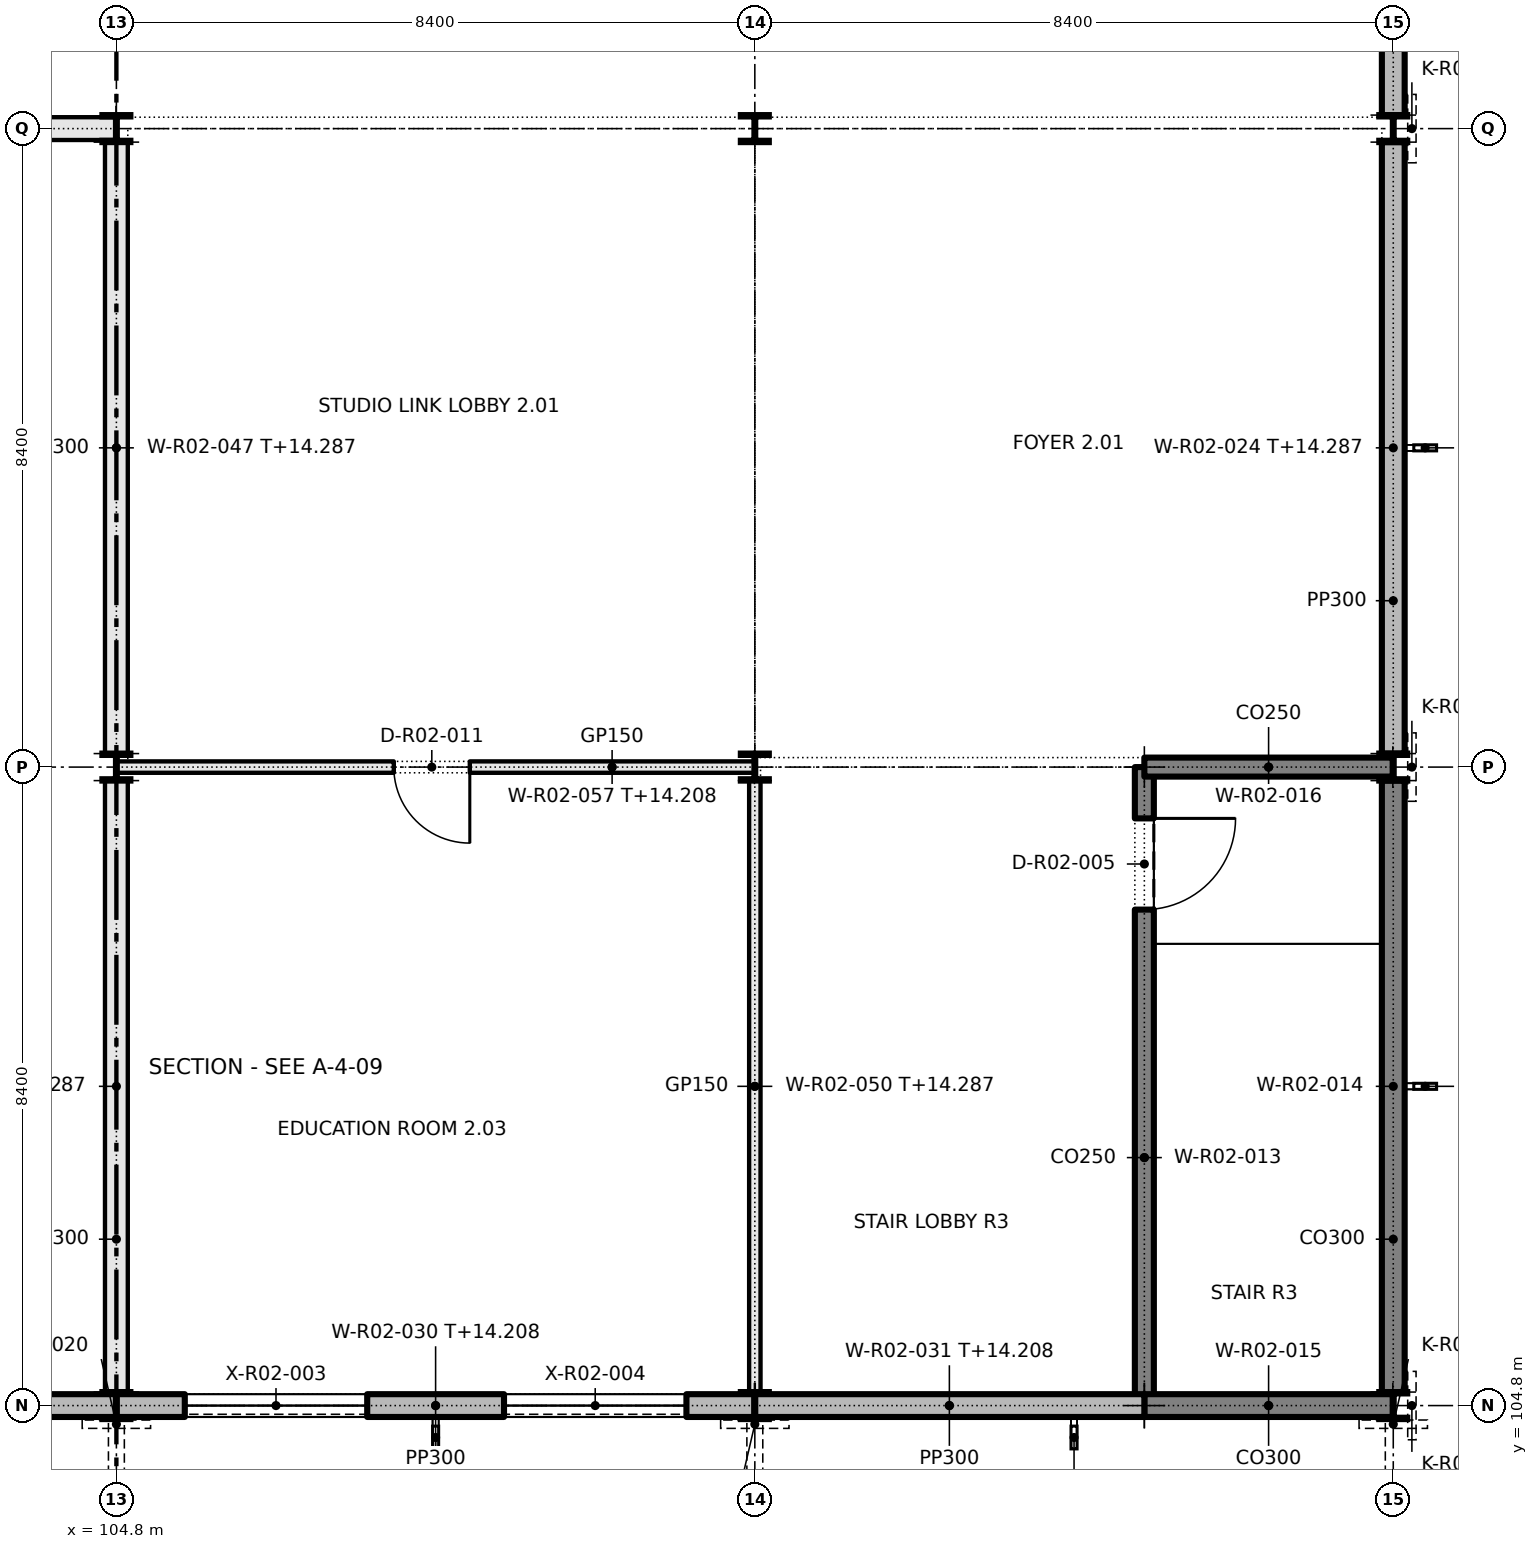
"""IFC4 building model, lengths in metres.
Left out: names, types, materials, properties, quantities, classifications, styles, units other than length and angle.
Written with IfcOpenShell. Run it as: python <this file> out.ifc"""

import sys

from ifc_helpers import new_model, si_unit, direction, frame, frame_2d, origin, origin_2d, place, context, subcontext, project, spatial, rectangle, i_section, extrude, element, fill, save


model = new_model("IFC4")
c1 = context("Model", 3, precision=1e-05, world=origin(), true_north=direction((0.0, 1.0)))
c2 = subcontext(c1, "Body", "Model", "MODEL_VIEW")
j1 = project(units=[si_unit("LENGTHUNIT", "METRE"), si_unit("PLANEANGLEUNIT", "RADIAN")], contexts=[c1])
p1 = place(None, origin())
s1 = spatial("IfcSite", under=j1, at=p1, CompositionType="ELEMENT")
p2 = place(p1, origin())
s2 = spatial("IfcBuilding", under=s1, at=p2, CompositionType="ELEMENT")
p3 = place(p2, frame((0.0, 0.0, 10.2)))
s3 = spatial("IfcBuildingStorey", under=s2, at=p3, CompositionType="ELEMENT", Elevation=10.2)
for number, where, z_axis, x_axis in (
    (1, (104.8, 104.8, 0.0), (0.0, 0.0, 1.0), (1.0, 0.0, 0.0)),
    (2, (104.8, 113.2, 0.0), (0.0, 0.0, 1.0), (1.0, 0.0, 0.0)),
    (3, (104.8, 121.6, 0.0), (0.0, 0.0, 1.0), (1.0, 0.0, 0.0)),
    (4, (113.2, 104.8, 0.0), (0.0, 0.0, 1.0), (1.0, 0.0, 0.0)),
    (5, (113.2, 113.2, 0.0), (0.0, 0.0, 1.0), (1.0, 0.0, 0.0)),
    (6, (113.2, 121.6, 0.0), (0.0, 0.0, 1.0), (1.0, 0.0, 0.0)),
    (7, (121.6, 104.8, 0.0), (0.0, 0.0, 1.0), (1.0, 0.0, 0.0)),
    (8, (121.6, 113.2, 0.0), (0.0, 0.0, 1.0), (1.0, 0.0, 0.0)),
    (9, (121.6, 121.6, 0.0), (0.0, 0.0, 1.0), (1.0, 0.0, 0.0)),
):
    element("IfcColumn", number, at=place(p3, frame(where, z_axis=z_axis, x_axis=x_axis)), inside=s3, PredefinedType="COLUMN", context=c2, shape_type="SweptSolid", body=[
        extrude(i_section(OverallWidth=0.368, OverallDepth=0.356, WebThickness=0.011, FlangeThickness=0.018, FilletRadius=0.015, at=origin_2d()), origin(), (0.0, 0.0, 1.0), 4.8),
    ])
p4 = place(p3, frame((118.325, 104.8, 0.0), z_axis=(0.0, 0.0, 1.0), x_axis=(0.0, 1.0, 0.0)))
e10 = element("IfcWall", 10, at=p4, inside=s3, PredefinedType="SHEAR", context=c2, shape_type="SweptSolid", body=[
    extrude(rectangle(XDim=8.4, YDim=0.25, at=frame_2d((4.2, 0.0))), origin(), (0.0, 0.0, 1.0), 4.8),
])
p5 = place(p4, frame((6.525, 0.0, 0.0)))
e11 = element("IfcOpeningElement", 11, at=p5, cuts=e10, PredefinedType="OPENING", context=c2, shape_type="SweptSolid", body=[
    extrude(rectangle(XDim=1.2, YDim=2.1, at=frame_2d((0.6, 1.05))), frame((0.0, 0.135, 0.0), z_axis=(0.0, -1.0, 0.0), x_axis=(1.0, 0.0, 0.0)), (0.0, 0.0, 1.0), 0.27),
])
p6 = place(p3, frame((121.6, 104.978, 0.0), z_axis=(0.0, 0.0, 1.0), x_axis=(0.0, 1.0, 0.0)))
e12 = element("IfcWall", 12, at=p6, inside=s3, PredefinedType="SHEAR", context=c2, shape_type="SweptSolid", body=[
    extrude(rectangle(XDim=8.044, YDim=0.3, at=frame_2d((4.022, 0.0))), origin(), (0.0, 0.0, 1.0), 4.8),
])
p7 = place(p3, frame((118.325, 104.8, 0.0), z_axis=(0.0, 0.0, 1.0), x_axis=(1.0, 0.0, 0.0)))
e13 = element("IfcWall", 13, at=p7, inside=s3, PredefinedType="SHEAR", context=c2, shape_type="SweptSolid", body=[
    extrude(rectangle(XDim=3.27, YDim=0.3, at=frame_2d((1.635, 0.0))), origin(), (0.0, 0.0, 1.0), 4.8),
])
p8 = place(p3, frame((118.325, 113.2, 0.0), z_axis=(0.0, 0.0, 1.0), x_axis=(1.0, 0.0, 0.0)))
e14 = element("IfcWall", 14, at=p8, inside=s3, PredefinedType="SHEAR", context=c2, shape_type="SweptSolid", body=[
    extrude(rectangle(XDim=3.27, YDim=0.25, at=frame_2d((1.635, 0.0))), origin(), (0.0, 0.0, 1.0), 4.8),
])
p9 = place(p3, frame((121.6, 113.378, 0.0), z_axis=(0.0, 0.0, 1.0), x_axis=(0.0, 1.0, 0.0)))
e15 = element("IfcWall", 15, at=p9, inside=s3, PredefinedType="SOLIDWALL", context=c2, shape_type="SweptSolid", body=[
    extrude(rectangle(XDim=8.044, YDim=0.3, at=frame_2d((4.022, 0.0))), origin(), (0.0, 0.0, 1.0), 4.087),
])
p10 = place(p3, frame((121.6, 121.778, 0.0), z_axis=(0.0, 0.0, 1.0), x_axis=(0.0, 1.0, 0.0)))
e16 = element("IfcWall", 16, at=p10, inside=s3, PredefinedType="SOLIDWALL", context=c2, shape_type="SweptSolid", body=[
    extrude(rectangle(XDim=8.044, YDim=0.3, at=frame_2d((4.022, 0.0))), origin(), (0.0, 0.0, 1.0), 4.087),
])
p11 = place(p10, frame((4.922, 0.0, 0.95)))
e17 = element("IfcOpeningElement", 17, at=p11, cuts=e16, PredefinedType="OPENING", context=c2, shape_type="SweptSolid", body=[
    extrude(rectangle(XDim=2.4, YDim=1.8, at=frame_2d((1.2, 0.9))), frame((0.0, 0.16, 0.0), z_axis=(0.0, -1.0, 0.0), x_axis=(1.0, 0.0, 0.0)), (0.0, 0.0, 1.0), 0.32),
])
p12 = place(p3, frame((96.395, 104.8, 0.0), z_axis=(0.0, 0.0, 1.0), x_axis=(1.0, 0.0, 0.0)))
e18 = element("IfcWall", 18, at=p12, inside=s3, PredefinedType="SOLIDWALL", context=c2, shape_type="SweptSolid", body=[
    extrude(rectangle(XDim=8.411, YDim=0.3, at=frame_2d((4.206, 0.0))), origin(), (0.0, 0.0, 1.0), 4.008),
])
p13 = place(p3, frame((104.794, 104.8, 0.0), z_axis=(0.0, 0.0, 1.0), x_axis=(1.0, 0.0, 0.0)))
e19 = element("IfcWall", 19, at=p13, inside=s3, PredefinedType="SOLIDWALL", context=c2, shape_type="SweptSolid", body=[
    extrude(rectangle(XDim=8.411, YDim=0.3, at=frame_2d((4.206, 0.0))), origin(), (0.0, 0.0, 1.0), 4.008),
])
p14 = place(p13, frame((0.906, 0.0, 0.95)))
e20 = element("IfcOpeningElement", 20, at=p14, cuts=e19, PredefinedType="OPENING", context=c2, shape_type="SweptSolid", body=[
    extrude(rectangle(XDim=2.4, YDim=1.8, at=frame_2d((1.2, 0.9))), frame((0.0, 0.16, 0.0), z_axis=(0.0, -1.0, 0.0), x_axis=(1.0, 0.0, 0.0)), (0.0, 0.0, 1.0), 0.32),
])
p15 = place(p13, frame((5.105, 0.0, 0.95)))
e21 = element("IfcOpeningElement", 21, at=p15, cuts=e19, PredefinedType="OPENING", context=c2, shape_type="SweptSolid", body=[
    extrude(rectangle(XDim=2.4, YDim=1.8, at=frame_2d((1.2, 0.9))), frame((0.0, 0.16, 0.0), z_axis=(0.0, -1.0, 0.0), x_axis=(1.0, 0.0, 0.0)), (0.0, 0.0, 1.0), 0.32),
])
p16 = place(p3, frame((113.194, 104.8, 0.0), z_axis=(0.0, 0.0, 1.0), x_axis=(1.0, 0.0, 0.0)))
e22 = element("IfcWall", 22, at=p16, inside=s3, PredefinedType="SOLIDWALL", context=c2, shape_type="SweptSolid", body=[
    extrude(rectangle(XDim=5.131, YDim=0.3, at=frame_2d((2.565, 0.0))), origin(), (0.0, 0.0, 1.0), 4.008),
])
for number, where, z_axis, x_axis in (
    (23, (104.8, 113.378, 0.0), (0.0, 0.0, 1.0), (0.0, 1.0, 0.0)),
    (24, (104.8, 104.978, 0.0), (0.0, 0.0, 1.0), (0.0, 1.0, 0.0)),
):
    element("IfcWall", number, at=place(p3, frame(where, z_axis=z_axis, x_axis=x_axis)), inside=s3, PredefinedType="PARTITIONING", context=c2, shape_type="SweptSolid", body=[
        extrude(rectangle(XDim=8.044, YDim=0.3, at=frame_2d((4.022, 0.0))), origin(), (0.0, 0.0, 1.0), 4.087),
    ])
p17 = place(p3, frame((113.2, 104.978, 0.0), z_axis=(0.0, 0.0, 1.0), x_axis=(0.0, 1.0, 0.0)))
e25 = element("IfcWall", 25, at=p17, inside=s3, PredefinedType="PARTITIONING", context=c2, shape_type="SweptSolid", body=[
    extrude(rectangle(XDim=8.044, YDim=0.15, at=frame_2d((4.022, 0.0))), origin(), (0.0, 0.0, 1.0), 4.087),
])
p18 = place(p3, frame((104.806, 113.2, 0.0), z_axis=(0.0, 0.0, 1.0), x_axis=(1.0, 0.0, 0.0)))
e26 = element("IfcWall", 26, at=p18, inside=s3, PredefinedType="PARTITIONING", context=c2, shape_type="SweptSolid", body=[
    extrude(rectangle(XDim=8.389, YDim=0.15, at=frame_2d((4.194, 0.0))), origin(), (0.0, 0.0, 1.0), 4.008),
])
p19 = place(p18, frame((3.645, 0.0, 0.0)))
e27 = element("IfcOpeningElement", 27, at=p19, cuts=e26, PredefinedType="OPENING", context=c2, shape_type="SweptSolid", body=[
    extrude(rectangle(XDim=1.0, YDim=2.1, at=frame_2d((0.5, 1.05))), frame((0.0, 0.085, 0.0), z_axis=(0.0, -1.0, 0.0), x_axis=(1.0, 0.0, 0.0)), (0.0, 0.0, 1.0), 0.17),
])
p20 = place(p3, frame((96.395, 121.6, 0.0), z_axis=(0.0, 0.0, 1.0), x_axis=(1.0, 0.0, 0.0)))
e28 = element("IfcWall", 28, at=p20, inside=s3, PredefinedType="PARTITIONING", context=c2, shape_type="SweptSolid", body=[
    extrude(rectangle(XDim=8.4, YDim=0.3, at=frame_2d((4.2, 0.0))), origin(), (0.0, 0.0, 1.0), 4.008),
])
p21 = place(p14, origin())
e29 = element("IfcWindow", 29, at=p21, inside=s3, PartitioningType="DOUBLE_PANEL_VERTICAL", PredefinedType="WINDOW", context=c2, shape_type="SweptSolid", body=[
    extrude(rectangle(XDim=2.4, YDim=1.8, at=frame_2d((1.2, 0.9))), frame((0.0, 0.03, 0.0), z_axis=(0.0, -1.0, 0.0), x_axis=(1.0, 0.0, 0.0)), (0.0, 0.0, 1.0), 0.06),
])
fill(e20, e29)
p22 = place(p15, origin())
e30 = element("IfcWindow", 30, at=p22, inside=s3, PartitioningType="DOUBLE_PANEL_VERTICAL", PredefinedType="WINDOW", context=c2, shape_type="SweptSolid", body=[
    extrude(rectangle(XDim=2.4, YDim=1.8, at=frame_2d((1.2, 0.9))), frame((0.0, 0.03, 0.0), z_axis=(0.0, -1.0, 0.0), x_axis=(1.0, 0.0, 0.0)), (0.0, 0.0, 1.0), 0.06),
])
fill(e21, e30)
p23 = place(p5, frame((1.2, 0.0, 0.0), z_axis=(0.0, 0.0, 1.0), x_axis=(-1.0, 0.0, 0.0)))
e31 = element("IfcDoor", 31, at=p23, inside=s3, OperationType="SINGLE_SWING_LEFT", PredefinedType="DOOR", context=c2, shape_type="SweptSolid", body=[
    extrude(rectangle(XDim=1.2, YDim=2.1, at=frame_2d((0.6, 1.05))), frame((0.0, 0.025, 0.0), z_axis=(0.0, -1.0, 0.0), x_axis=(1.0, 0.0, 0.0)), (0.0, 0.0, 1.0), 0.05),
])
fill(e11, e31)
p24 = place(p19, frame((1.0, 0.0, 0.0), z_axis=(0.0, 0.0, 1.0), x_axis=(-1.0, 0.0, 0.0)))
e32 = element("IfcDoor", 32, at=p24, inside=s3, OperationType="SINGLE_SWING_LEFT", PredefinedType="DOOR", context=c2, shape_type="SweptSolid", body=[
    extrude(rectangle(XDim=1.0, YDim=2.1, at=frame_2d((0.5, 1.05))), frame((0.0, 0.025, 0.0), z_axis=(0.0, -1.0, 0.0), x_axis=(1.0, 0.0, 0.0)), (0.0, 0.0, 1.0), 0.05),
])
fill(e27, e32)
save(model, sys.argv[1])
